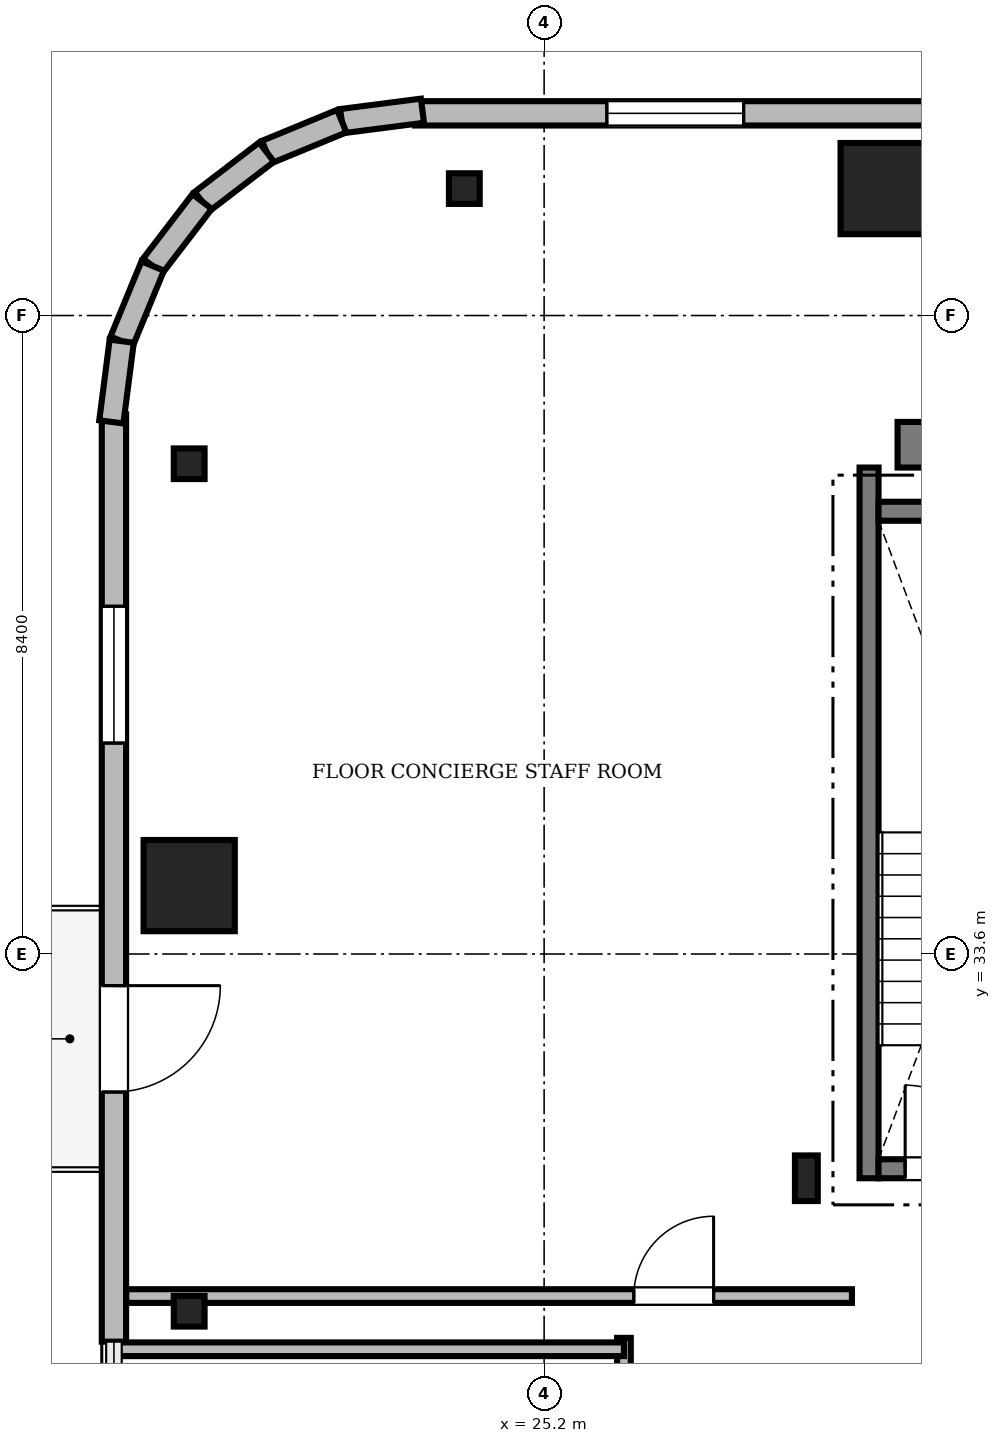
"""IFC4 building model, lengths in metres.
Left out: names, types, materials, properties, quantities, classifications, styles, units other than length and angle.
Written with IfcOpenShell. Run it as: python <this file> out.ifc"""

import sys

from ifc_helpers import new_model, si_unit, direction, frame, frame_2d, origin, origin_2d, place, context, subcontext, project, spatial, rectangle, i_section, extrude, source, transform, mapped, element, fill, save


model = new_model("IFC4")
c1 = context("Model", 3, precision=1e-05, world=origin(), true_north=direction((0.0, 1.0)))
c2 = subcontext(c1, "Body", "Model", "MODEL_VIEW")
j1 = project(units=[si_unit("LENGTHUNIT", "METRE"), si_unit("PLANEANGLEUNIT", "RADIAN")], contexts=[c1])
p1 = place(None, origin())
s1 = spatial("IfcSite", under=j1, at=p1, CompositionType="ELEMENT")
p2 = place(p1, origin())
s2 = spatial("IfcBuilding", under=s1, at=p2, CompositionType="ELEMENT")
p3 = place(p2, frame((0.0, 0.0, 282.2)))
s3 = spatial("IfcBuildingStorey", under=s2, at=p3, CompositionType="ELEMENT", Elevation=282.2)
m1 = source(origin(), c2, "Body", "SweptSolid", [
    extrude(rectangle(XDim=17.52, YDim=0.6, at=frame_2d((8.76, 0.0))), origin(), (0.0, 0.0, 1.0), 3.3),
])
p4 = place(p3, frame((29.85, 40.3, 0.0), z_axis=(0.0, 0.0, 1.0), x_axis=(1.0, 0.0, 0.0)))
e1 = element("IfcWall", 1, at=p4, inside=s3, PredefinedType="SHEAR", context=c2, shape_type="MappedRepresentation", body=[
    mapped(m1, transform((0.0, 0.0, 0.0), scale=1.0)),
])
m2 = source(origin(), c2, "Body", "SweptSolid", [
    extrude(i_section(OverallWidth=0.3, OverallDepth=0.6, WebThickness=0.015, FlangeThickness=0.03, FilletRadius=0.027, at=origin_2d()), origin(), (0.0, 0.0, 1.0), 3.3),
])
p5 = place(p3, frame((28.65, 30.65, 0.0), z_axis=(0.0, 0.0, 1.0), x_axis=(1.0, 0.0, 0.0)))
e2 = element("IfcColumn", 2, at=p5, inside=s3, PredefinedType="COLUMN", context=c2, shape_type="MappedRepresentation", body=[
    mapped(m2, transform((0.0, 0.0, 0.0), scale=1.0)),
])
m3 = source(origin(), c2, "Body", "SweptSolid", [
    extrude(rectangle(XDim=1.2, YDim=1.2, at=origin_2d()), origin(), (0.0, 0.0, 1.0), 5.814),
])
p6 = place(p3, frame((29.7, 43.67, 0.0), z_axis=(0.818058492506, -0.092882937348, 0.567585291202), x_axis=(0.11281585058, 0.99361591365, 0.0)))
e3 = element("IfcColumn", 3, at=p6, inside=s3, PredefinedType="COLUMN", context=c2, shape_type="MappedRepresentation", body=[
    mapped(m3, transform((0.0, 0.0, 0.0), scale=1.0)),
])
m4 = source(origin(), c2, "Body", "SweptSolid", [
    extrude(rectangle(XDim=1.2, YDim=1.2, at=origin_2d()), origin(), (0.0, 0.0, 1.0), 6.03),
])
p7 = place(p3, frame((20.53, 34.5, 0.0), z_axis=(0.835861798334, -0.042473310718, 0.547294319322), x_axis=(0.05074832087, 0.998711473815, 0.0)))
e4 = element("IfcColumn", 4, at=p7, inside=s3, PredefinedType="COLUMN", context=c2, shape_type="MappedRepresentation", body=[
    mapped(m4, transform((0.0, 0.0, 0.0), scale=1.0)),
])
m5 = source(origin(), c2, "Body", "SweptSolid", [
    extrude(i_section(OverallWidth=0.405, OverallDepth=0.403, WebThickness=0.018, FlangeThickness=0.028, FilletRadius=0.015, at=origin_2d()), origin(), (0.0, 0.0, 1.0), 5.955),
])
p8 = place(p3, frame((24.15, 43.67, 0.0), z_axis=(0.827427261615, -0.090692686323, 0.554201193957), x_axis=(0.1089555096, 0.99404662714, 0.0)))
e5 = element("IfcColumn", 5, at=p8, inside=s3, PredefinedType="COLUMN", context=c2, shape_type="MappedRepresentation", body=[
    mapped(m5, transform((0.0, 0.0, 0.0), scale=1.0)),
])
m6 = source(origin(), c2, "Body", "SweptSolid", [
    extrude(i_section(OverallWidth=0.405, OverallDepth=0.403, WebThickness=0.018, FlangeThickness=0.028, FilletRadius=0.015, at=origin_2d()), origin(), (0.0, 0.0, 1.0), 6.039),
])
p9 = place(p3, frame((20.53, 40.05, 0.0), z_axis=(0.834523086314, -0.070702425788, 0.546417775514), x_axis=(0.084419521225, 0.996430300842, 0.0)))
e6 = element("IfcColumn", 6, at=p9, inside=s3, PredefinedType="COLUMN", context=c2, shape_type="MappedRepresentation", body=[
    mapped(m6, transform((0.0, 0.0, 0.0), scale=1.0)),
])
m7 = source(origin(), c2, "Body", "SweptSolid", [
    extrude(i_section(OverallWidth=0.405, OverallDepth=0.403, WebThickness=0.018, FlangeThickness=0.028, FilletRadius=0.015, at=origin_2d()), origin(), (0.0, 0.0, 1.0), 6.024),
])
p10 = place(p3, frame((20.53, 28.9, 0.0), z_axis=(0.836616759812, 0.0, 0.54778864282), x_axis=(0.0, 1.0, 0.0)))
e7 = element("IfcColumn", 7, at=p10, inside=s3, PredefinedType="COLUMN", context=c2, shape_type="MappedRepresentation", body=[
    mapped(m7, transform((0.0, 0.0, 0.0), scale=1.0)),
])
m8 = source(origin(), c2, "Body", "SweptSolid", [
    extrude(rectangle(XDim=12.2, YDim=0.32, at=frame_2d((6.1, 0.0))), origin(), (0.0, 0.0, 1.0), 3.3),
])
p11 = place(p3, frame((35.7, 44.66, 0.0), z_axis=(0.0, 0.0, 1.0), x_axis=(-1.0, 0.0, 0.0)))
e8 = element("IfcWall", 8, at=p11, inside=s3, PredefinedType="SOLIDWALL", context=c2, shape_type="MappedRepresentation", body=[
    mapped(m8, transform((0.0, 0.0, 0.0), scale=1.0)),
])
m9 = source(origin(), c2, "Body", "SweptSolid", [
    extrude(rectangle(XDim=1.8, YDim=2.4, at=frame_2d((0.9, 1.2))), frame((0.0, 0.17, 0.0), z_axis=(0.0, -1.0, 0.0), x_axis=(1.0, 0.0, 0.0)), (0.0, 0.0, 1.0), 0.34),
])
p12 = place(p11, frame((7.875, 0.0, 0.64)))
e9 = element("IfcOpeningElement", 9, at=p12, cuts=e8, PredefinedType="OPENING", context=c2, shape_type="MappedRepresentation", body=[
    mapped(m9, transform((0.0, 0.0, 0.0), scale=1.0)),
])
p13 = place(p3, frame((19.54, 40.7, 0.0), z_axis=(0.0, 0.0, 1.0), x_axis=(0.0, -1.0, 0.0)))
e10 = element("IfcWall", 10, at=p13, inside=s3, PredefinedType="SOLIDWALL", context=c2, shape_type="MappedRepresentation", body=[
    mapped(m8, transform((0.0, 0.0, 0.0), scale=1.0)),
])
m10 = source(origin(), c2, "Body", "SweptSolid", [
    extrude(rectangle(XDim=1.4, YDim=2.3, at=frame_2d((0.7, 1.15))), frame((0.0, 0.17, 0.0), z_axis=(0.0, -1.0, 0.0), x_axis=(1.0, 0.0, 0.0)), (0.0, 0.0, 1.0), 0.34),
])
p14 = place(p13, frame((7.516, 0.0, 0.0)))
e11 = element("IfcOpeningElement", 11, at=p14, cuts=e10, PredefinedType="OPENING", context=c2, shape_type="MappedRepresentation", body=[
    mapped(m10, transform((0.0, 0.0, 0.0), scale=1.0)),
])
p15 = place(p13, frame((2.525, 0.0, 0.64)))
e12 = element("IfcOpeningElement", 12, at=p15, cuts=e10, PredefinedType="OPENING", context=c2, shape_type="MappedRepresentation", body=[
    mapped(m9, transform((0.0, 0.0, 0.0), scale=1.0)),
])
m11 = source(origin(), c2, "Body", "SweptSolid", [
    extrude(rectangle(XDim=1.071, YDim=0.32, at=frame_2d((0.535, 0.0))), origin(), (0.0, 0.0, 1.0), 3.3),
])
p16 = place(p3, frame((23.599, 44.694, 0.0), z_axis=(0.0, 0.0, 1.0), x_axis=(-0.99181144545, -0.127710832249, 0.0)))
e13 = element("IfcWall", 13, at=p16, inside=s3, PredefinedType="SOLIDWALL", context=c2, shape_type="MappedRepresentation", body=[
    mapped(m11, transform((0.0, 0.0, 0.0), scale=1.0)),
])
m12 = source(origin(), c2, "Body", "SweptSolid", [
    extrude(rectangle(XDim=1.07, YDim=0.32, at=frame_2d((0.535, 0.0))), origin(), (0.0, 0.0, 1.0), 3.3),
])
p17 = place(p3, frame((22.537, 44.558, 0.0), z_axis=(0.0, 0.0, 1.0), x_axis=(-0.92468282569, -0.380738324673, 0.0)))
e14 = element("IfcWall", 14, at=p17, inside=s3, PredefinedType="SOLIDWALL", context=c2, shape_type="MappedRepresentation", body=[
    mapped(m12, transform((0.0, 0.0, 0.0), scale=1.0)),
])
m13 = source(origin(), c2, "Body", "SweptSolid", [
    extrude(rectangle(XDim=1.069, YDim=0.32, at=frame_2d((0.534, 0.0))), origin(), (0.0, 0.0, 1.0), 3.3),
])
p18 = place(p3, frame((21.548, 44.15, 0.0), z_axis=(0.0, 0.0, 1.0), x_axis=(-0.793735015643, -0.60826369688, 0.0)))
e15 = element("IfcWall", 15, at=p18, inside=s3, PredefinedType="SOLIDWALL", context=c2, shape_type="MappedRepresentation", body=[
    mapped(m13, transform((0.0, 0.0, 0.0), scale=1.0)),
])
m14 = source(origin(), c2, "Body", "SweptSolid", [
    extrude(rectangle(XDim=1.069, YDim=0.32, at=frame_2d((0.535, 0.0))), origin(), (0.0, 0.0, 1.0), 3.3),
])
p19 = place(p3, frame((20.7, 43.5, 0.0), z_axis=(0.0, 0.0, 1.0), x_axis=(-0.608297311401, -0.793709254666, 0.0)))
e16 = element("IfcWall", 16, at=p19, inside=s3, PredefinedType="SOLIDWALL", context=c2, shape_type="MappedRepresentation", body=[
    mapped(m14, transform((0.0, 0.0, 0.0), scale=1.0)),
])
p20 = place(p3, frame((20.05, 42.652, 0.0), z_axis=(0.0, 0.0, 1.0), x_axis=(-0.380738324673, -0.92468282569, 0.0)))
e17 = element("IfcWall", 17, at=p20, inside=s3, PredefinedType="SOLIDWALL", context=c2, shape_type="MappedRepresentation", body=[
    mapped(m12, transform((0.0, 0.0, 0.0), scale=1.0)),
])
p21 = place(p3, frame((19.642, 41.663, 0.0), z_axis=(0.0, 0.0, 1.0), x_axis=(-0.127710832249, -0.99181144545, 0.0)))
e18 = element("IfcWall", 18, at=p21, inside=s3, PredefinedType="SOLIDWALL", context=c2, shape_type="MappedRepresentation", body=[
    mapped(m11, transform((0.0, 0.0, 0.0), scale=1.0)),
])
m15 = source(origin(), c2, "Body", "SweptSolid", [
    extrude(rectangle(XDim=9.35, YDim=0.25, at=frame_2d((4.675, 0.0))), origin(), (0.0, 0.0, 1.0), 3.75),
])
p22 = place(p3, frame((29.475, 30.65, 0.0), z_axis=(0.0, 0.0, 1.0), x_axis=(0.0, 1.0, 0.0)))
e19 = element("IfcWall", 19, at=p22, inside=s3, PredefinedType="SOLIDWALL", context=c2, shape_type="MappedRepresentation", body=[
    mapped(m15, transform((0.0, 0.0, 0.0), scale=1.0)),
])
m16 = source(origin(), c2, "Body", "SweptSolid", [
    extrude(rectangle(XDim=3.15, YDim=0.25, at=frame_2d((1.575, 0.0))), origin(), (0.0, 0.0, 1.0), 3.75),
])
p23 = place(p3, frame((29.6, 39.425, 0.0), z_axis=(0.0, 0.0, 1.0), x_axis=(1.0, 0.0, 0.0)))
e20 = element("IfcWall", 20, at=p23, inside=s3, PredefinedType="SOLIDWALL", context=c2, shape_type="MappedRepresentation", body=[
    mapped(m16, transform((0.0, 0.0, 0.0), scale=1.0)),
])
p24 = place(p3, frame((29.6, 30.775, 0.0), z_axis=(0.0, 0.0, 1.0), x_axis=(1.0, 0.0, 0.0)))
e21 = element("IfcWall", 21, at=p24, inside=s3, PredefinedType="SOLIDWALL", context=c2, shape_type="MappedRepresentation", body=[
    mapped(m16, transform((0.0, 0.0, 0.0), scale=1.0)),
])
m17 = source(origin(), c2, "Body", "SweptSolid", [
    extrude(rectangle(XDim=1.1, YDim=2.2, at=frame_2d((0.55, 1.1))), frame((0.0, 0.135, 0.0), z_axis=(0.0, -1.0, 0.0), x_axis=(1.0, 0.0, 0.0)), (0.0, 0.0, 1.0), 0.27),
])
p25 = place(p24, frame((0.35, 0.0, 0.0)))
e22 = element("IfcOpeningElement", 22, at=p25, cuts=e21, PredefinedType="OPENING", context=c2, shape_type="MappedRepresentation", body=[
    mapped(m17, transform((0.0, 0.0, 0.0), scale=1.0)),
])
m18 = source(origin(), c2, "Body", "SweptSolid", [
    extrude(rectangle(XDim=14.54, YDim=0.18, at=frame_2d((7.27, 0.0))), origin(), (0.0, 0.0, 1.0), 2.478),
])
p26 = place(p3, frame((26.25, 14.01, 0.0), z_axis=(0.0, 0.0, 1.0), x_axis=(0.0, 1.0, 0.0)))
e23 = element("IfcWall", 23, at=p26, inside=s3, PredefinedType="PARTITIONING", context=c2, shape_type="MappedRepresentation", body=[
    mapped(m18, transform((0.0, 0.0, 0.0), scale=1.0)),
])
m19 = source(origin(), c2, "Body", "SweptSolid", [
    extrude(rectangle(XDim=1.05, YDim=2.2, at=frame_2d((0.525, 1.1))), frame((0.0, 0.1, 0.0), z_axis=(0.0, -1.0, 0.0), x_axis=(1.0, 0.0, 0.0)), (0.0, 0.0, 1.0), 0.2),
])
p27 = place(p26, frame((3.077, 0.0, 0.0)))
e24 = element("IfcOpeningElement", 24, at=p27, cuts=e23, PredefinedType="OPENING", context=c2, shape_type="MappedRepresentation", body=[
    mapped(m19, transform((0.0, 0.0, 0.0), scale=1.0)),
])
m20 = source(origin(), c2, "Body", "SweptSolid", [
    extrude(rectangle(XDim=0.95, YDim=2.15, at=frame_2d((0.475, 1.075))), frame((0.0, 0.1, 0.0), z_axis=(0.0, -1.0, 0.0), x_axis=(1.0, 0.0, 0.0)), (0.0, 0.0, 1.0), 0.2),
])
p28 = place(p26, frame((11.498, 0.0, 0.0)))
e25 = element("IfcOpeningElement", 25, at=p28, cuts=e23, PredefinedType="OPENING", context=c2, shape_type="MappedRepresentation", body=[
    mapped(m20, transform((0.0, 0.0, 0.0), scale=1.0)),
])
m21 = source(origin(), c2, "Body", "SweptSolid", [
    extrude(rectangle(XDim=9.548, YDim=0.18, at=frame_2d((4.774, 0.0))), origin(), (0.0, 0.0, 1.0), 2.08),
])
p29 = place(p3, frame((19.702, 29.1, 0.0), z_axis=(0.0, 0.0, 1.0), x_axis=(1.0, 0.0, 0.0)))
e26 = element("IfcWall", 26, at=p29, inside=s3, PredefinedType="PARTITIONING", context=c2, shape_type="MappedRepresentation", body=[
    mapped(m21, transform((0.0, 0.0, 0.0), scale=1.0)),
])
p30 = place(p29, frame((6.678, 0.0, 0.0)))
e27 = element("IfcOpeningElement", 27, at=p30, cuts=e26, PredefinedType="OPENING", context=c2, shape_type="MappedRepresentation", body=[
    mapped(m19, transform((0.0, 0.0, 0.0), scale=1.0)),
])
m22 = source(origin(), c2, "Body", "SweptSolid", [
    extrude(rectangle(XDim=6.74, YDim=0.18, at=frame_2d((3.37, 0.0))), origin(), (0.0, 0.0, 1.0), 2.08),
])
p31 = place(p3, frame((19.51, 28.4, 0.0), z_axis=(0.0, 0.0, 1.0), x_axis=(1.0, 0.0, 0.0)))
e28 = element("IfcWall", 28, at=p31, inside=s3, PredefinedType="PARTITIONING", context=c2, shape_type="MappedRepresentation", body=[
    mapped(m22, transform((0.0, 0.0, 0.0), scale=1.0)),
])
m23 = source(origin(), c2, "Body", "SweptSolid", [
    extrude(rectangle(XDim=1.8, YDim=2.4, at=frame_2d((0.9, 1.2))), frame((0.0, 0.03, 0.0), z_axis=(0.0, -1.0, 0.0), x_axis=(1.0, 0.0, 0.0)), (0.0, 0.0, 1.0), 0.06),
])
p32 = place(p12, origin())
e29 = element("IfcWindow", 29, at=p32, inside=s3, PartitioningType="SINGLE_PANEL", PredefinedType="WINDOW", context=c2, shape_type="MappedRepresentation", body=[
    mapped(m23, transform((0.0, 0.0, 0.0), scale=1.0)),
])
fill(e9, e29)
m24 = source(origin(), c2, "Body", "SweptSolid", [
    extrude(rectangle(XDim=1.4, YDim=2.3, at=frame_2d((0.7, 1.15))), frame((0.0, 0.025, 0.0), z_axis=(0.0, -1.0, 0.0), x_axis=(1.0, 0.0, 0.0)), (0.0, 0.0, 1.0), 0.05),
])
p33 = place(p14, frame((1.4, 0.0, 0.0), z_axis=(0.0, 0.0, 1.0), x_axis=(-1.0, 0.0, 0.0)))
e30 = element("IfcDoor", 30, at=p33, inside=s3, OperationType="DOUBLE_DOOR_SLIDING", PredefinedType="DOOR", context=c2, shape_type="MappedRepresentation", body=[
    mapped(m24, transform((0.0, 0.0, 0.0), scale=1.0)),
])
fill(e11, e30)
p34 = place(p15, origin())
e31 = element("IfcWindow", 31, at=p34, inside=s3, PartitioningType="SINGLE_PANEL", PredefinedType="WINDOW", context=c2, shape_type="MappedRepresentation", body=[
    mapped(m23, transform((0.0, 0.0, 0.0), scale=1.0)),
])
fill(e12, e31)
m25 = source(origin(), c2, "Body", "SweptSolid", [
    extrude(rectangle(XDim=1.1, YDim=2.2, at=frame_2d((0.55, 1.1))), frame((0.0, 0.025, 0.0), z_axis=(0.0, -1.0, 0.0), x_axis=(1.0, 0.0, 0.0)), (0.0, 0.0, 1.0), 0.05),
])
p35 = place(p25, origin())
e32 = element("IfcDoor", 32, at=p35, inside=s3, OperationType="SINGLE_SWING_LEFT", PredefinedType="DOOR", context=c2, shape_type="MappedRepresentation", body=[
    mapped(m25, transform((0.0, 0.0, 0.0), scale=1.0)),
])
fill(e22, e32)
m26 = source(origin(), c2, "Body", "SweptSolid", [
    extrude(rectangle(XDim=1.05, YDim=2.2, at=frame_2d((0.525, 1.1))), frame((0.0, 0.025, 0.0), z_axis=(0.0, -1.0, 0.0), x_axis=(1.0, 0.0, 0.0)), (0.0, 0.0, 1.0), 0.05),
])
p36 = place(p30, origin())
e33 = element("IfcDoor", 33, at=p36, inside=s3, OperationType="SINGLE_SWING_RIGHT", PredefinedType="DOOR", context=c2, shape_type="MappedRepresentation", body=[
    mapped(m26, transform((0.0, 0.0, 0.0), scale=1.0)),
])
fill(e27, e33)
save(model, sys.argv[1])
